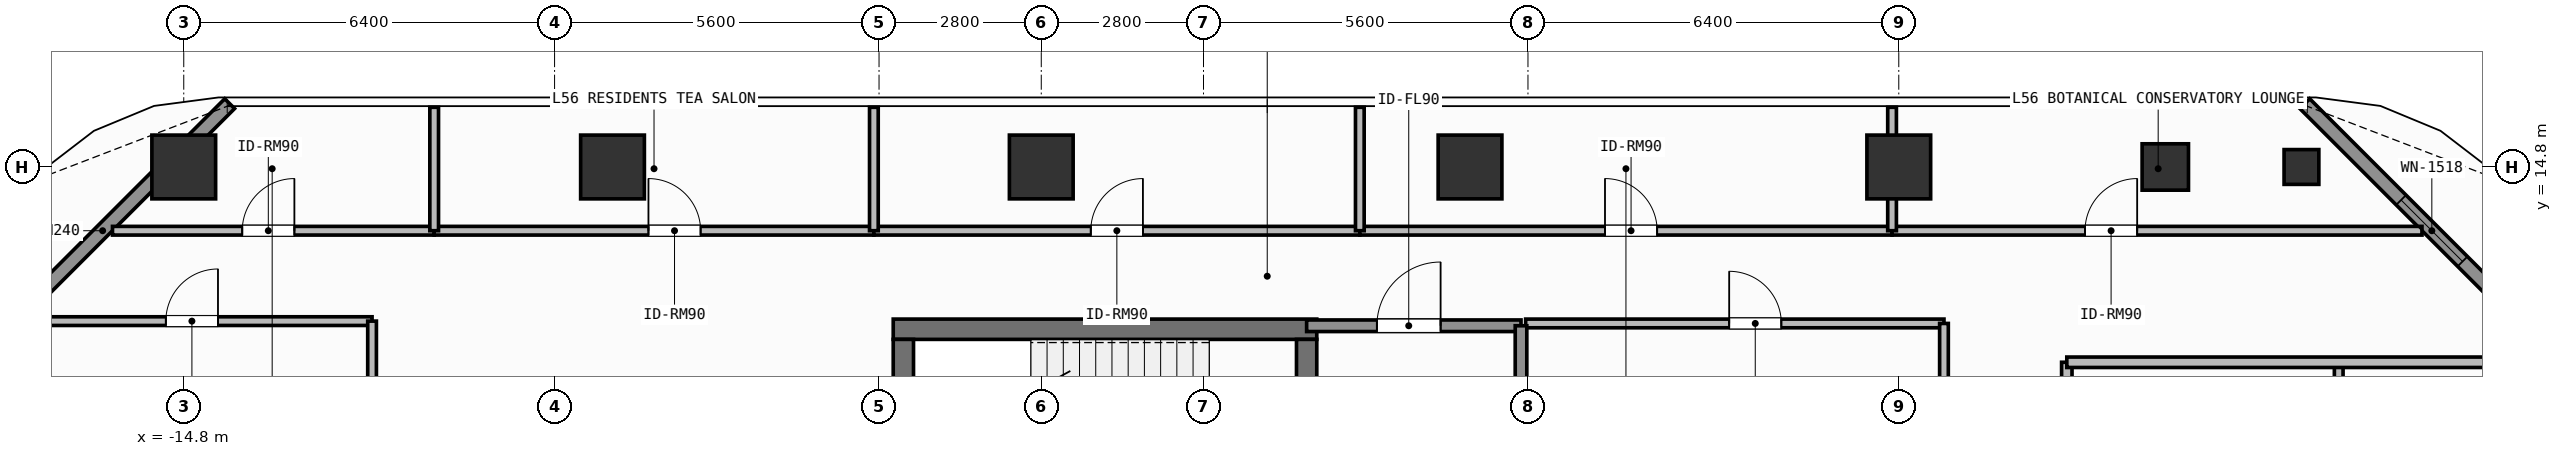
"""IFC4 building model, lengths in metres.
Left out: names, types, materials, properties, quantities, classifications, styles, units other than length and angle.
Written with IfcOpenShell. Run it as: python <this file> out.ifc"""

import sys

from ifc_helpers import new_model, si_unit, direction, frame, frame_2d, origin, origin_2d, place, context, subcontext, project, spatial, rectangle, hollow_rectangle, extrude, element, fill, save


model = new_model("IFC4")
c1 = context("Model", 3, precision=1e-05, world=origin(), true_north=direction((0.0, 1.0)))
c2 = subcontext(c1, "Body", "Model", "MODEL_VIEW")
j1 = project(units=[si_unit("LENGTHUNIT", "METRE"), si_unit("PLANEANGLEUNIT", "RADIAN")], contexts=[c1])
p1 = place(None, origin())
s1 = spatial("IfcSite", under=j1, at=p1, CompositionType="ELEMENT")
p2 = place(p1, origin())
s2 = spatial("IfcBuilding", under=s1, at=p2, CompositionType="ELEMENT")
p3 = place(p2, frame((0.0, 0.0, 227.4)))
s3 = spatial("IfcBuildingStorey", under=s2, at=p3, CompositionType="ELEMENT", Elevation=227.4)
p4 = place(p3, frame((-2.555, 12.0, 0.0), z_axis=(0.0, 0.0, 1.0), x_axis=(1.0, 0.0, 0.0)))
e1 = element("IfcWall", 1, at=p4, inside=s3, PredefinedType="SHEAR", context=c2, shape_type="SweptSolid", body=[
    extrude(rectangle(XDim=7.31, YDim=0.35, at=frame_2d((3.655, 0.0))), origin(), (0.0, 0.0, 1.0), 3.9),
])
p5 = place(p3, frame((-2.38, 8.9, 0.0), z_axis=(0.0, 0.0, 1.0), x_axis=(0.0, 1.0, 0.0)))
e2 = element("IfcWall", 2, at=p5, inside=s3, PredefinedType="SHEAR", context=c2, shape_type="SweptSolid", body=[
    extrude(rectangle(XDim=2.925, YDim=0.35, at=frame_2d((1.462, 0.0))), origin(), (0.0, 0.0, 1.0), 3.9),
])
p6 = place(p3, frame((4.58, 11.825, 0.0), z_axis=(0.0, 0.0, 1.0), x_axis=(0.0, -1.0, 0.0)))
e3 = element("IfcWall", 3, at=p6, inside=s3, PredefinedType="SHEAR", context=c2, shape_type="SweptSolid", body=[
    extrude(rectangle(XDim=2.925, YDim=0.35, at=frame_2d((1.462, 0.0))), origin(), (0.0, 0.0, 1.0), 3.9),
])
p7 = place(p6, frame((0.913, 0.0, 0.0)))
e4 = element("IfcOpeningElement", 4, at=p7, cuts=e3, PredefinedType="OPENING", context=c2, shape_type="SweptSolid", body=[
    extrude(rectangle(XDim=1.1, YDim=2.15, at=frame_2d((0.55, 1.075))), frame((0.0, 0.185, 0.0), z_axis=(0.0, -1.0, 0.0), x_axis=(1.0, 0.0, 0.0)), (0.0, 0.0, 1.0), 0.37),
])
for number, where, z_axis, x_axis in (
    (5, (-14.8, 14.8, 0.0), (0.0, 0.0, 1.0), (1.0, 0.0, 0.0)),
    (6, (-7.4, 14.8, 0.0), (0.0, 0.0, 1.0), (1.0, 0.0, 0.0)),
    (7, (0.0, 14.8, 0.0), (0.0, 0.0, 1.0), (1.0, 0.0, 0.0)),
    (8, (7.4, 14.8, 0.0), (0.0, 0.0, 1.0), (1.0, 0.0, 0.0)),
    (9, (14.8, 14.8, 0.0), (0.0, 0.0, 1.0), (1.0, 0.0, 0.0)),
):
    element("IfcColumn", number, at=place(p3, frame(where, z_axis=z_axis, x_axis=x_axis)), inside=s3, PredefinedType="COLUMN", context=c2, shape_type="SweptSolid", body=[
        extrude(rectangle(XDim=1.1, YDim=1.1, at=origin_2d()), origin(), (0.0, 0.0, 1.0), 3.9),
    ])
p8 = place(p3, frame((19.4, 14.8, 0.0), z_axis=(0.0, 0.0, 1.0), x_axis=(1.0, 0.0, 0.0)))
e10 = element("IfcColumn", 10, at=p8, inside=s3, PredefinedType="COLUMN", context=c2, shape_type="SweptSolid", body=[
    extrude(hollow_rectangle(XDim=0.8, YDim=0.8, WallThickness=0.036, at=origin_2d()), origin(), (0.0, 0.0, 1.0), 3.9),
])
p9 = place(p3, frame((21.75, 14.8, 0.0), z_axis=(0.0, 0.0, 1.0), x_axis=(1.0, 0.0, 0.0)))
e11 = element("IfcColumn", 11, at=p9, inside=s3, PredefinedType="COLUMN", context=c2, shape_type="SweptSolid", body=[
    extrude(hollow_rectangle(XDim=0.6, YDim=0.6, WallThickness=0.028, at=origin_2d()), origin(), (0.0, 0.0, 1.0), 3.9),
])
p10 = place(p3, frame((-18.392, 11.508, 0.0), z_axis=(0.0, 0.0, 1.0), x_axis=(0.707106781187, 0.707106781187, 0.0)))
e12 = element("IfcWall", 12, at=p10, inside=s3, PredefinedType="SOLIDWALL", context=c2, shape_type="SweptSolid", body=[
    extrude(rectangle(XDim=6.201, YDim=0.24, at=frame_2d((3.101, 0.0))), origin(), (0.0, 0.0, 1.0), 3.68),
])
p11 = place(p3, frame((21.808, 15.892, 0.0), z_axis=(0.0, 0.0, 1.0), x_axis=(0.707106781187, -0.707106781187, 0.0)))
e13 = element("IfcWall", 13, at=p11, inside=s3, PredefinedType="SOLIDWALL", context=c2, shape_type="SweptSolid", body=[
    extrude(rectangle(XDim=6.201, YDim=0.24, at=frame_2d((3.101, 0.0))), origin(), (0.0, 0.0, 1.0), 3.68),
])
p12 = place(p11, frame((2.351, 0.0, 0.8)))
e14 = element("IfcOpeningElement", 14, at=p12, cuts=e13, PredefinedType="OPENING", context=c2, shape_type="SweptSolid", body=[
    extrude(rectangle(XDim=1.5, YDim=1.85, at=frame_2d((0.75, 0.925))), frame((0.0, 0.13, 0.0), z_axis=(0.0, -1.0, 0.0), x_axis=(1.0, 0.0, 0.0)), (0.0, 0.0, 1.0), 0.26),
])
p13 = place(p3, frame((4.58, 12.06, 0.0), z_axis=(0.0, 0.0, 1.0), x_axis=(1.0, 0.0, 0.0)))
e15 = element("IfcWall", 15, at=p13, inside=s3, PredefinedType="SOLIDWALL", context=c2, shape_type="SweptSolid", body=[
    extrude(rectangle(XDim=3.7, YDim=0.2, at=frame_2d((1.85, 0.0))), origin(), (0.0, 0.0, 1.0), 3.68),
])
p14 = place(p13, frame((1.212, 0.0, 0.0)))
e16 = element("IfcOpeningElement", 16, at=p14, cuts=e15, PredefinedType="OPENING", context=c2, shape_type="SweptSolid", body=[
    extrude(rectangle(XDim=1.1, YDim=2.15, at=frame_2d((0.55, 1.075))), frame((0.0, 0.11, 0.0), z_axis=(0.0, -1.0, 0.0), x_axis=(1.0, 0.0, 0.0)), (0.0, 0.0, 1.0), 0.22),
])
p15 = place(p3, frame((8.36, 12.1, 0.0), z_axis=(0.0, 0.0, 1.0), x_axis=(1.0, 0.0, 0.0)))
e17 = element("IfcWall", 17, at=p15, inside=s3, PredefinedType="PARTITIONING", context=c2, shape_type="SweptSolid", body=[
    extrude(rectangle(XDim=7.22, YDim=0.15, at=frame_2d((3.61, 0.0))), origin(), (0.0, 0.0, 1.0), 3.68),
])
p16 = place(p15, frame((3.513, 0.0, 0.0)))
e18 = element("IfcOpeningElement", 18, at=p16, cuts=e17, PredefinedType="OPENING", context=c2, shape_type="SweptSolid", body=[
    extrude(rectangle(XDim=0.9, YDim=2.1, at=frame_2d((0.45, 1.05))), frame((0.0, 0.085, 0.0), z_axis=(0.0, -1.0, 0.0), x_axis=(1.0, 0.0, 0.0)), (0.0, 0.0, 1.0), 0.17),
])
p17 = place(p3, frame((-16.03, 13.7, 0.0), z_axis=(0.0, 0.0, 1.0), x_axis=(1.0, 0.0, 0.0)))
e19 = element("IfcWall", 19, at=p17, inside=s3, PredefinedType="PARTITIONING", context=c2, shape_type="SweptSolid", body=[
    extrude(rectangle(XDim=5.552, YDim=0.15, at=frame_2d((2.776, 0.0))), origin(), (0.0, 0.0, 1.0), 3.68),
])
p18 = place(p17, frame((2.24, 0.0, 0.0)))
e20 = element("IfcOpeningElement", 20, at=p18, cuts=e19, PredefinedType="OPENING", context=c2, shape_type="SweptSolid", body=[
    extrude(rectangle(XDim=0.9, YDim=2.1, at=frame_2d((0.45, 1.05))), frame((0.0, 0.085, 0.0), z_axis=(0.0, -1.0, 0.0), x_axis=(1.0, 0.0, 0.0)), (0.0, 0.0, 1.0), 0.17),
])
p19 = place(p3, frame((-10.478, 13.7, 0.0), z_axis=(0.0, 0.0, 1.0), x_axis=(1.0, 0.0, 0.0)))
e21 = element("IfcWall", 21, at=p19, inside=s3, PredefinedType="PARTITIONING", context=c2, shape_type="SweptSolid", body=[
    extrude(rectangle(XDim=7.589, YDim=0.15, at=frame_2d((3.794, 0.0))), origin(), (0.0, 0.0, 1.0), 3.68),
])
p20 = place(p19, frame((3.698, 0.0, 0.0)))
e22 = element("IfcOpeningElement", 22, at=p20, cuts=e21, PredefinedType="OPENING", context=c2, shape_type="SweptSolid", body=[
    extrude(rectangle(XDim=0.9, YDim=2.1, at=frame_2d((0.45, 1.05))), frame((0.0, 0.085, 0.0), z_axis=(0.0, -1.0, 0.0), x_axis=(1.0, 0.0, 0.0)), (0.0, 0.0, 1.0), 0.17),
])
p21 = place(p3, frame((-2.889, 13.7, 0.0), z_axis=(0.0, 0.0, 1.0), x_axis=(1.0, 0.0, 0.0)))
e23 = element("IfcWall", 23, at=p21, inside=s3, PredefinedType="PARTITIONING", context=c2, shape_type="SweptSolid", body=[
    extrude(rectangle(XDim=8.387, YDim=0.15, at=frame_2d((4.193, 0.0))), origin(), (0.0, 0.0, 1.0), 3.68),
])
p22 = place(p21, frame((3.743, 0.0, 0.0)))
e24 = element("IfcOpeningElement", 24, at=p22, cuts=e23, PredefinedType="OPENING", context=c2, shape_type="SweptSolid", body=[
    extrude(rectangle(XDim=0.9, YDim=2.1, at=frame_2d((0.45, 1.05))), frame((0.0, 0.085, 0.0), z_axis=(0.0, -1.0, 0.0), x_axis=(1.0, 0.0, 0.0)), (0.0, 0.0, 1.0), 0.17),
])
p23 = place(p3, frame((5.498, 13.7, 0.0), z_axis=(0.0, 0.0, 1.0), x_axis=(1.0, 0.0, 0.0)))
e25 = element("IfcWall", 25, at=p23, inside=s3, PredefinedType="PARTITIONING", context=c2, shape_type="SweptSolid", body=[
    extrude(rectangle(XDim=9.186, YDim=0.15, at=frame_2d((4.593, 0.0))), origin(), (0.0, 0.0, 1.0), 3.68),
])
p24 = place(p23, frame((4.231, 0.0, 0.0)))
e26 = element("IfcOpeningElement", 26, at=p24, cuts=e25, PredefinedType="OPENING", context=c2, shape_type="SweptSolid", body=[
    extrude(rectangle(XDim=0.9, YDim=2.1, at=frame_2d((0.45, 1.05))), frame((0.0, 0.085, 0.0), z_axis=(0.0, -1.0, 0.0), x_axis=(1.0, 0.0, 0.0)), (0.0, 0.0, 1.0), 0.17),
])
p25 = place(p3, frame((14.684, 13.7, 0.0), z_axis=(0.0, 0.0, 1.0), x_axis=(1.0, 0.0, 0.0)))
e27 = element("IfcWall", 27, at=p25, inside=s3, PredefinedType="PARTITIONING", context=c2, shape_type="SweptSolid", body=[
    extrude(rectangle(XDim=9.146, YDim=0.15, at=frame_2d((4.573, 0.0))), origin(), (0.0, 0.0, 1.0), 3.68),
])
p26 = place(p25, frame((3.33, 0.0, 0.0)))
e28 = element("IfcOpeningElement", 28, at=p26, cuts=e27, PredefinedType="OPENING", context=c2, shape_type="SweptSolid", body=[
    extrude(rectangle(XDim=0.9, YDim=2.1, at=frame_2d((0.45, 1.05))), frame((0.0, 0.085, 0.0), z_axis=(0.0, -1.0, 0.0), x_axis=(1.0, 0.0, 0.0)), (0.0, 0.0, 1.0), 0.17),
])
p27 = place(p3, frame((-17.59, 12.14, 0.0), z_axis=(0.0, 0.0, 1.0), x_axis=(1.0, 0.0, 0.0)))
e29 = element("IfcWall", 29, at=p27, inside=s3, PredefinedType="PARTITIONING", context=c2, shape_type="SweptSolid", body=[
    extrude(rectangle(XDim=6.04, YDim=0.15, at=frame_2d((3.02, 0.0))), origin(), (0.0, 0.0, 1.0), 3.68),
])
p28 = place(p27, frame((2.481, 0.0, 0.0)))
e30 = element("IfcOpeningElement", 30, at=p28, cuts=e29, PredefinedType="OPENING", context=c2, shape_type="SweptSolid", body=[
    extrude(rectangle(XDim=0.9, YDim=2.1, at=frame_2d((0.45, 1.05))), frame((0.0, 0.085, 0.0), z_axis=(0.0, -1.0, 0.0), x_axis=(1.0, 0.0, 0.0)), (0.0, 0.0, 1.0), 0.17),
])
p29 = place(p3, frame((17.7, -1.193, 0.0), z_axis=(0.0, 0.0, 1.0), x_axis=(0.0, 1.0, 0.0)))
e31 = element("IfcWall", 31, at=p29, inside=s3, PredefinedType="PARTITIONING", context=c2, shape_type="SweptSolid", body=[
    extrude(rectangle(XDim=12.623, YDim=0.18, at=frame_2d((6.312, 0.0))), origin(), (0.0, 0.0, 1.0), 3.68),
])
p30 = place(p29, frame((6.26, 0.0, 0.0)))
e32 = element("IfcOpeningElement", 32, at=p30, cuts=e31, PredefinedType="OPENING", context=c2, shape_type="SweptSolid", body=[
    extrude(rectangle(XDim=1.0, YDim=2.2, at=frame_2d((0.5, 1.1))), frame((0.0, 0.1, 0.0), z_axis=(0.0, -1.0, 0.0), x_axis=(1.0, 0.0, 0.0)), (0.0, 0.0, 1.0), 0.2),
])
p31 = place(p3, frame((8.28, 8.8, 0.0), z_axis=(0.0, 0.0, 1.0), x_axis=(0.0, 1.0, 0.0)))
e33 = element("IfcWall", 33, at=p31, inside=s3, PredefinedType="SOLIDWALL", context=c2, shape_type="SweptSolid", body=[
    extrude(rectangle(XDim=3.26, YDim=0.2, at=frame_2d((1.63, 0.0))), origin(), (0.0, 0.0, 1.0), 3.68),
])
p32 = place(p3, frame((15.58, 5.85, 0.0), z_axis=(0.0, 0.0, 1.0), x_axis=(0.0, 1.0, 0.0)))
e34 = element("IfcWall", 34, at=p32, inside=s3, PredefinedType="PARTITIONING", context=c2, shape_type="SweptSolid", body=[
    extrude(rectangle(XDim=6.25, YDim=0.15, at=frame_2d((3.125, 0.0))), origin(), (0.0, 0.0, 1.0), 3.68),
])
for number, where, z_axis, x_axis in (
    (35, (-10.478, 13.7, 0.0), (0.0, 0.0, 1.0), (0.0, 1.0, 0.0)),
    (36, (-2.889, 13.7, 0.0), (0.0, 0.0, 1.0), (0.0, 1.0, 0.0)),
    (37, (5.498, 13.7, 0.0), (0.0, 0.0, 1.0), (0.0, 1.0, 0.0)),
):
    element("IfcWall", number, at=place(p3, frame(where, z_axis=z_axis, x_axis=x_axis)), inside=s3, PredefinedType="PARTITIONING", context=c2, shape_type="SweptSolid", body=[
        extrude(rectangle(XDim=2.13, YDim=0.15, at=frame_2d((1.065, 0.0))), origin(), (0.0, 0.0, 1.0), 3.68),
    ])
p33 = place(p3, frame((14.684, 13.7, 0.0), z_axis=(0.0, 0.0, 1.0), x_axis=(0.0, 1.0, 0.0)))
e38 = element("IfcWall", 38, at=p33, inside=s3, PredefinedType="PARTITIONING", context=c2, shape_type="SweptSolid", body=[
    extrude(rectangle(XDim=2.13, YDim=0.15, at=frame_2d((1.065, 0.0))), origin(), (0.0, 0.0, 1.0), 3.182),
])
p34 = place(p3, frame((-11.55, 1.8, 0.0), z_axis=(0.0, 0.0, 1.0), x_axis=(0.0, 1.0, 0.0)))
e39 = element("IfcWall", 39, at=p34, inside=s3, PredefinedType="PARTITIONING", context=c2, shape_type="SweptSolid", body=[
    extrude(rectangle(XDim=10.34, YDim=0.15, at=frame_2d((5.17, 0.0))), origin(), (0.0, 0.0, 1.0), 3.68),
])
p35 = place(p3, frame((22.393, 8.461, 0.0), z_axis=(0.0, 0.0, 1.0), x_axis=(0.0, 1.0, 0.0)))
e40 = element("IfcWall", 40, at=p35, inside=s3, PredefinedType="PARTITIONING", context=c2, shape_type="SweptSolid", body=[
    extrude(rectangle(XDim=2.969, YDim=0.15, at=frame_2d((1.484, 0.0))), origin(), (0.0, 0.0, 1.0), 3.68),
])
p36 = place(p3, frame((17.7, 11.43, 0.0), z_axis=(0.0, 0.0, 1.0), x_axis=(1.0, 0.0, 0.0)))
e41 = element("IfcWall", 41, at=p36, inside=s3, PredefinedType="PARTITIONING", context=c2, shape_type="SweptSolid", body=[
    extrude(rectangle(XDim=8.43, YDim=0.18, at=frame_2d((4.215, 0.0))), origin(), (0.0, 0.0, 1.0), 3.42),
])
p37 = place(p12, origin())
e42 = element("IfcWindow", 42, at=p37, inside=s3, PartitioningType="SINGLE_PANEL", PredefinedType="WINDOW", context=c2, shape_type="SweptSolid", body=[
    extrude(rectangle(XDim=1.5, YDim=1.85, at=frame_2d((0.75, 0.925))), frame((0.0, 0.03, 0.0), z_axis=(0.0, -1.0, 0.0), x_axis=(1.0, 0.0, 0.0)), (0.0, 0.0, 1.0), 0.06),
])
fill(e14, e42)
p38 = place(p14, origin())
e43 = element("IfcDoor", 43, at=p38, inside=s3, OperationType="SINGLE_SWING_RIGHT", PredefinedType="DOOR", context=c2, shape_type="SweptSolid", body=[
    extrude(rectangle(XDim=1.1, YDim=2.15, at=frame_2d((0.55, 1.075))), frame((0.0, 0.025, 0.0), z_axis=(0.0, -1.0, 0.0), x_axis=(1.0, 0.0, 0.0)), (0.0, 0.0, 1.0), 0.05),
])
fill(e16, e43)
p39 = place(p16, origin())
e44 = element("IfcDoor", 44, at=p39, inside=s3, OperationType="SINGLE_SWING_LEFT", PredefinedType="DOOR", context=c2, shape_type="SweptSolid", body=[
    extrude(rectangle(XDim=0.9, YDim=2.1, at=frame_2d((0.45, 1.05))), frame((0.0, 0.025, 0.0), z_axis=(0.0, -1.0, 0.0), x_axis=(1.0, 0.0, 0.0)), (0.0, 0.0, 1.0), 0.05),
])
fill(e18, e44)
p40 = place(p18, origin())
e45 = element("IfcDoor", 45, at=p40, inside=s3, OperationType="SINGLE_SWING_RIGHT", PredefinedType="DOOR", context=c2, shape_type="SweptSolid", body=[
    extrude(rectangle(XDim=0.9, YDim=2.1, at=frame_2d((0.45, 1.05))), frame((0.0, 0.025, 0.0), z_axis=(0.0, -1.0, 0.0), x_axis=(1.0, 0.0, 0.0)), (0.0, 0.0, 1.0), 0.05),
])
fill(e20, e45)
p41 = place(p20, origin())
e46 = element("IfcDoor", 46, at=p41, inside=s3, OperationType="SINGLE_SWING_LEFT", PredefinedType="DOOR", context=c2, shape_type="SweptSolid", body=[
    extrude(rectangle(XDim=0.9, YDim=2.1, at=frame_2d((0.45, 1.05))), frame((0.0, 0.025, 0.0), z_axis=(0.0, -1.0, 0.0), x_axis=(1.0, 0.0, 0.0)), (0.0, 0.0, 1.0), 0.05),
])
fill(e22, e46)
p42 = place(p22, origin())
e47 = element("IfcDoor", 47, at=p42, inside=s3, OperationType="SINGLE_SWING_RIGHT", PredefinedType="DOOR", context=c2, shape_type="SweptSolid", body=[
    extrude(rectangle(XDim=0.9, YDim=2.1, at=frame_2d((0.45, 1.05))), frame((0.0, 0.025, 0.0), z_axis=(0.0, -1.0, 0.0), x_axis=(1.0, 0.0, 0.0)), (0.0, 0.0, 1.0), 0.05),
])
fill(e24, e47)
p43 = place(p24, origin())
e48 = element("IfcDoor", 48, at=p43, inside=s3, OperationType="SINGLE_SWING_LEFT", PredefinedType="DOOR", context=c2, shape_type="SweptSolid", body=[
    extrude(rectangle(XDim=0.9, YDim=2.1, at=frame_2d((0.45, 1.05))), frame((0.0, 0.025, 0.0), z_axis=(0.0, -1.0, 0.0), x_axis=(1.0, 0.0, 0.0)), (0.0, 0.0, 1.0), 0.05),
])
fill(e26, e48)
p44 = place(p26, origin())
e49 = element("IfcDoor", 49, at=p44, inside=s3, OperationType="SINGLE_SWING_RIGHT", PredefinedType="DOOR", context=c2, shape_type="SweptSolid", body=[
    extrude(rectangle(XDim=0.9, YDim=2.1, at=frame_2d((0.45, 1.05))), frame((0.0, 0.025, 0.0), z_axis=(0.0, -1.0, 0.0), x_axis=(1.0, 0.0, 0.0)), (0.0, 0.0, 1.0), 0.05),
])
fill(e28, e49)
p45 = place(p28, origin())
e50 = element("IfcDoor", 50, at=p45, inside=s3, OperationType="SINGLE_SWING_RIGHT", PredefinedType="DOOR", context=c2, shape_type="SweptSolid", body=[
    extrude(rectangle(XDim=0.9, YDim=2.1, at=frame_2d((0.45, 1.05))), frame((0.0, 0.025, 0.0), z_axis=(0.0, -1.0, 0.0), x_axis=(1.0, 0.0, 0.0)), (0.0, 0.0, 1.0), 0.05),
])
fill(e30, e50)
save(model, sys.argv[1])
